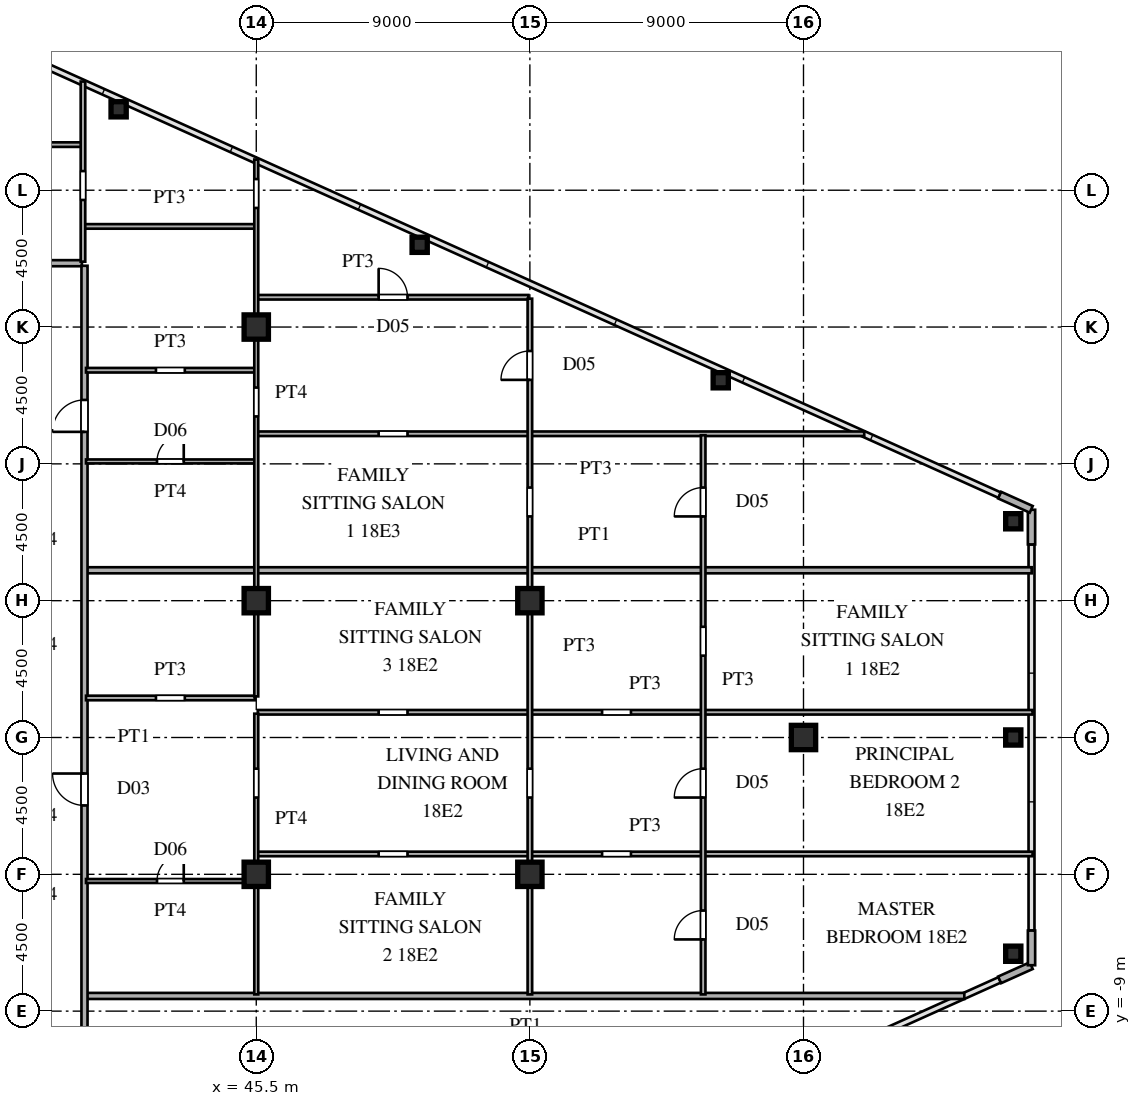
"""IFC4 building model, lengths in metres.
Left out: names, types, materials, properties, quantities, classifications, styles, units other than length and angle.
Written with IfcOpenShell. Run it as: python <this file> out.ifc"""

import sys

from ifc_helpers import new_model, si_unit, direction, frame, frame_2d, origin, origin_2d, place, context, subcontext, project, spatial, rectangle, hollow_rectangle, i_section, extrude, source, transform, mapped, element, fill, save


model = new_model("IFC4")
c1 = context("Model", 3, precision=1e-05, world=origin(), true_north=direction((0.0, 1.0)))
c2 = subcontext(c1, "Body", "Model", "MODEL_VIEW")
j1 = project(units=[si_unit("LENGTHUNIT", "METRE"), si_unit("PLANEANGLEUNIT", "RADIAN")], contexts=[c1])
p1 = place(None, origin())
s1 = spatial("IfcSite", under=j1, at=p1, CompositionType="ELEMENT")
p2 = place(p1, origin())
s2 = spatial("IfcBuilding", under=s1, at=p2, CompositionType="ELEMENT")
p3 = place(p2, frame((0.0, 0.0, 69.3)))
s3 = spatial("IfcBuildingStorey", under=s2, at=p3, CompositionType="ELEMENT", Elevation=69.3)
m1 = source(origin(), c2, "Body", "SweptSolid", [
    extrude(i_section(OverallWidth=0.8, OverallDepth=0.8, WebThickness=0.032, FlangeThickness=0.05, at=origin_2d()), origin(), (0.0, 0.0, 1.0), 3.6),
])
for number, where, z_axis, x_axis in (
    (1, (45.5, -4.5, 0.0), (0.0, 0.0, 1.0), (1.0, 0.0, 0.0)),
    (2, (45.5, 4.5, 0.0), (0.0, 0.0, 1.0), (1.0, 0.0, 0.0)),
    (3, (45.5, 13.5, 0.0), (0.0, 0.0, 1.0), (1.0, 0.0, 0.0)),
    (4, (54.5, -4.5, 0.0), (0.0, 0.0, 1.0), (1.0, 0.0, 0.0)),
    (5, (54.5, 4.5, 0.0), (0.0, 0.0, 1.0), (1.0, 0.0, 0.0)),
    (6, (63.5, 0.0, 0.0), (0.0, 0.0, 1.0), (1.0, 0.0, 0.0)),
):
    element("IfcColumn", number, at=place(p3, frame(where, z_axis=z_axis, x_axis=x_axis)), inside=s3, PredefinedType="COLUMN", context=c2, shape_type="MappedRepresentation", body=[
        mapped(m1, transform((0.0, 0.0, 0.0), scale=1.0)),
    ])
m2 = source(origin(), c2, "Body", "SweptSolid", [
    extrude(hollow_rectangle(XDim=0.5, YDim=0.5, WallThickness=0.02, at=origin_2d()), origin(), (0.0, 0.0, 1.0), 3.6),
])
for number, where, z_axis, x_axis in (
    (7, (70.4, -7.112, 0.0), (0.0, 0.0, 1.0), (1.0, 0.0, 0.0)),
    (8, (70.4, 7.112, 0.0), (0.0, 0.0, 1.0), (1.0, 0.0, 0.0)),
    (9, (40.973, 20.661, 0.0), (0.0, 0.0, 1.0), (1.0, 0.0, 0.0)),
    (10, (50.875, 16.205, 0.0), (0.0, 0.0, 1.0), (1.0, 0.0, 0.0)),
    (11, (60.778, 11.749, 0.0), (0.0, 0.0, 1.0), (1.0, 0.0, 0.0)),
    (12, (70.4, 0.0, 0.0), (0.0, 0.0, 1.0), (1.0, 0.0, 0.0)),
):
    element("IfcColumn", number, at=place(p3, frame(where, z_axis=z_axis, x_axis=x_axis)), inside=s3, PredefinedType="COLUMN", context=c2, shape_type="MappedRepresentation", body=[
        mapped(m2, transform((0.0, 0.0, 0.0), scale=1.0)),
    ])
for number, where, z_axis, x_axis in (
    (13, (69.951, -7.972, 0.0), (0.0, 0.0, 1.0), (0.912, 0.41, 0.0)),
    (14, (71.0, -7.49, 0.0), (0.0, 0.0, 1.0), (0.0, 1.0, 0.0)),
    (15, (71.0, 6.35, 0.0), (0.0, 0.0, 1.0), (0.0, 1.0, 0.0)),
    (16, (70.991, 7.504, 0.0), (0.0, 0.0, 1.0), (-0.912, 0.41, 0.0)),
):
    element("IfcWall", number, at=place(p3, frame(where, z_axis=z_axis, x_axis=x_axis)), inside=s3, PredefinedType="SOLIDWALL", context=c2, shape_type="SweptSolid", body=[
        extrude(rectangle(XDim=1.14, YDim=0.24, at=frame_2d((0.57, 0.0))), origin(), (0.0, 0.0, 1.0), 3.38),
    ])
p4 = place(p3, frame((39.93, -8.5, 0.0), z_axis=(0.0, 0.0, 1.0), x_axis=(1.0, 0.0, 0.0)))
e17 = element("IfcWall", 17, at=p4, inside=s3, PredefinedType="PARTITIONING", context=c2, shape_type="SweptSolid", body=[
    extrude(rectangle(XDim=28.86, YDim=0.2, at=frame_2d((14.43, 0.0))), origin(), (0.0, 0.0, 1.0), 3.38),
])
p5 = place(p3, frame((39.9, -4.72, 0.0), z_axis=(0.0, 0.0, 1.0), x_axis=(1.0, 0.0, 0.0)))
e18 = element("IfcWall", 18, at=p5, inside=s3, PredefinedType="PARTITIONING", context=c2, shape_type="SweptSolid", body=[
    extrude(rectangle(XDim=5.55, YDim=0.13, at=frame_2d((2.775, 0.0))), origin(), (0.0, 0.0, 1.0), 3.38),
])
p6 = place(p5, frame((2.335, 0.0, 0.0)))
e19 = element("IfcOpeningElement", 19, at=p6, cuts=e18, PredefinedType="OPENING", context=c2, shape_type="SweptSolid", body=[
    extrude(rectangle(XDim=0.88, YDim=2.1, at=frame_2d((0.44, 1.05))), frame((0.0, 0.075, 0.0), z_axis=(0.0, -1.0, 0.0), x_axis=(1.0, 0.0, 0.0)), (0.0, 0.0, 1.0), 0.15),
])
p7 = place(p3, frame((45.55, -3.83, 0.0), z_axis=(0.0, 0.0, 1.0), x_axis=(1.0, 0.0, 0.0)))
e20 = element("IfcWall", 20, at=p7, inside=s3, PredefinedType="PARTITIONING", context=c2, shape_type="SweptSolid", body=[
    extrude(rectangle(XDim=25.485, YDim=0.15, at=frame_2d((12.742, 0.0))), origin(), (0.0, 0.0, 1.0), 3.38),
])
p8 = place(p7, frame((3.975, 0.0, 0.0)))
e21 = element("IfcOpeningElement", 21, at=p8, cuts=e20, PredefinedType="OPENING", context=c2, shape_type="SweptSolid", body=[
    extrude(rectangle(XDim=0.95, YDim=2.15, at=frame_2d((0.475, 1.075))), frame((0.0, 0.085, 0.0), z_axis=(0.0, -1.0, 0.0), x_axis=(1.0, 0.0, 0.0)), (0.0, 0.0, 1.0), 0.17),
])
p9 = place(p7, frame((11.325, 0.0, 0.0)))
e22 = element("IfcOpeningElement", 22, at=p9, cuts=e20, PredefinedType="OPENING", context=c2, shape_type="SweptSolid", body=[
    extrude(rectangle(XDim=0.95, YDim=2.15, at=frame_2d((0.475, 1.075))), frame((0.0, 0.085, 0.0), z_axis=(0.0, -1.0, 0.0), x_axis=(1.0, 0.0, 0.0)), (0.0, 0.0, 1.0), 0.17),
])
p10 = place(p3, frame((45.55, 0.83, 0.0), z_axis=(0.0, 0.0, 1.0), x_axis=(1.0, 0.0, 0.0)))
e23 = element("IfcWall", 23, at=p10, inside=s3, PredefinedType="PARTITIONING", context=c2, shape_type="SweptSolid", body=[
    extrude(rectangle(XDim=25.485, YDim=0.15, at=frame_2d((12.742, 0.0))), origin(), (0.0, 0.0, 1.0), 3.38),
])
p11 = place(p10, frame((3.975, 0.0, 0.0)))
e24 = element("IfcOpeningElement", 24, at=p11, cuts=e23, PredefinedType="OPENING", context=c2, shape_type="SweptSolid", body=[
    extrude(rectangle(XDim=0.95, YDim=2.15, at=frame_2d((0.475, 1.075))), frame((0.0, 0.085, 0.0), z_axis=(0.0, -1.0, 0.0), x_axis=(1.0, 0.0, 0.0)), (0.0, 0.0, 1.0), 0.17),
])
p12 = place(p10, frame((11.325, 0.0, 0.0)))
e25 = element("IfcOpeningElement", 25, at=p12, cuts=e23, PredefinedType="OPENING", context=c2, shape_type="SweptSolid", body=[
    extrude(rectangle(XDim=0.95, YDim=2.15, at=frame_2d((0.475, 1.075))), frame((0.0, 0.085, 0.0), z_axis=(0.0, -1.0, 0.0), x_axis=(1.0, 0.0, 0.0)), (0.0, 0.0, 1.0), 0.17),
])
p13 = place(p3, frame((39.9, 1.3, 0.0), z_axis=(0.0, 0.0, 1.0), x_axis=(1.0, 0.0, 0.0)))
e26 = element("IfcWall", 26, at=p13, inside=s3, PredefinedType="PARTITIONING", context=c2, shape_type="SweptSolid", body=[
    extrude(rectangle(XDim=5.55, YDim=0.15, at=frame_2d((2.775, 0.0))), origin(), (0.0, 0.0, 1.0), 3.38),
])
p14 = place(p13, frame((2.3, 0.0, 0.0)))
e27 = element("IfcOpeningElement", 27, at=p14, cuts=e26, PredefinedType="OPENING", context=c2, shape_type="SweptSolid", body=[
    extrude(rectangle(XDim=0.95, YDim=2.15, at=frame_2d((0.475, 1.075))), frame((0.0, 0.085, 0.0), z_axis=(0.0, -1.0, 0.0), x_axis=(1.0, 0.0, 0.0)), (0.0, 0.0, 1.0), 0.17),
])
p15 = place(p3, frame((39.93, 5.5, 0.0), z_axis=(0.0, 0.0, 1.0), x_axis=(1.0, 0.0, 0.0)))
e28 = element("IfcWall", 28, at=p15, inside=s3, PredefinedType="PARTITIONING", context=c2, shape_type="SweptSolid", body=[
    extrude(rectangle(XDim=31.075, YDim=0.2, at=frame_2d((15.538, 0.0))), origin(), (0.0, 0.0, 1.0), 3.38),
])
p16 = place(p3, frame((39.9, 9.08, 0.0), z_axis=(0.0, 0.0, 1.0), x_axis=(1.0, 0.0, 0.0)))
e29 = element("IfcWall", 29, at=p16, inside=s3, PredefinedType="PARTITIONING", context=c2, shape_type="SweptSolid", body=[
    extrude(rectangle(XDim=5.55, YDim=0.13, at=frame_2d((2.775, 0.0))), origin(), (0.0, 0.0, 1.0), 3.38),
])
p17 = place(p16, frame((2.335, 0.0, 0.0)))
e30 = element("IfcOpeningElement", 30, at=p17, cuts=e29, PredefinedType="OPENING", context=c2, shape_type="SweptSolid", body=[
    extrude(rectangle(XDim=0.88, YDim=2.1, at=frame_2d((0.44, 1.05))), frame((0.0, 0.075, 0.0), z_axis=(0.0, -1.0, 0.0), x_axis=(1.0, 0.0, 0.0)), (0.0, 0.0, 1.0), 0.15),
])
p18 = place(p3, frame((45.55, 9.99, 0.0), z_axis=(0.0, 0.0, 1.0), x_axis=(1.0, 0.0, 0.0)))
e31 = element("IfcWall", 31, at=p18, inside=s3, PredefinedType="PARTITIONING", context=c2, shape_type="SweptSolid", body=[
    extrude(rectangle(XDim=19.948, YDim=0.15, at=frame_2d((9.974, 0.0))), origin(), (0.0, 0.0, 1.0), 3.38),
])
p19 = place(p18, frame((3.975, 0.0, 0.0)))
e32 = element("IfcOpeningElement", 32, at=p19, cuts=e31, PredefinedType="OPENING", context=c2, shape_type="SweptSolid", body=[
    extrude(rectangle(XDim=0.95, YDim=2.15, at=frame_2d((0.475, 1.075))), frame((0.0, 0.085, 0.0), z_axis=(0.0, -1.0, 0.0), x_axis=(1.0, 0.0, 0.0)), (0.0, 0.0, 1.0), 0.17),
])
p20 = place(p3, frame((39.9, 12.08, 0.0), z_axis=(0.0, 0.0, 1.0), x_axis=(1.0, 0.0, 0.0)))
e33 = element("IfcWall", 33, at=p20, inside=s3, PredefinedType="PARTITIONING", context=c2, shape_type="SweptSolid", body=[
    extrude(rectangle(XDim=5.55, YDim=0.15, at=frame_2d((2.775, 0.0))), origin(), (0.0, 0.0, 1.0), 3.38),
])
p21 = place(p20, frame((2.3, 0.0, 0.0)))
e34 = element("IfcOpeningElement", 34, at=p21, cuts=e33, PredefinedType="OPENING", context=c2, shape_type="SweptSolid", body=[
    extrude(rectangle(XDim=0.95, YDim=2.15, at=frame_2d((0.475, 1.075))), frame((0.0, 0.085, 0.0), z_axis=(0.0, -1.0, 0.0), x_axis=(1.0, 0.0, 0.0)), (0.0, 0.0, 1.0), 0.17),
])
p22 = place(p3, frame((45.55, 14.48, 0.0), z_axis=(0.0, 0.0, 1.0), x_axis=(1.0, 0.0, 0.0)))
e35 = element("IfcWall", 35, at=p22, inside=s3, PredefinedType="PARTITIONING", context=c2, shape_type="SweptSolid", body=[
    extrude(rectangle(XDim=8.9, YDim=0.15, at=frame_2d((4.45, 0.0))), origin(), (0.0, 0.0, 1.0), 3.38),
])
p23 = place(p22, frame((3.975, 0.0, 0.0)))
e36 = element("IfcOpeningElement", 36, at=p23, cuts=e35, PredefinedType="OPENING", context=c2, shape_type="SweptSolid", body=[
    extrude(rectangle(XDim=0.95, YDim=2.15, at=frame_2d((0.475, 1.075))), frame((0.0, 0.085, 0.0), z_axis=(0.0, -1.0, 0.0), x_axis=(1.0, 0.0, 0.0)), (0.0, 0.0, 1.0), 0.17),
])
p24 = place(p3, frame((36.585, 15.6, 0.0), z_axis=(0.0, 0.0, 1.0), x_axis=(1.0, 0.0, 0.0)))
e37 = element("IfcWall", 37, at=p24, inside=s3, PredefinedType="PARTITIONING", context=c2, shape_type="SweptSolid", body=[
    extrude(rectangle(XDim=3.18, YDim=0.2, at=frame_2d((1.59, 0.0))), origin(), (0.0, 0.0, 1.0), 3.38),
])
p25 = place(p3, frame((39.85, 16.81, 0.0), z_axis=(0.0, 0.0, 1.0), x_axis=(1.0, 0.0, 0.0)))
e38 = element("IfcWall", 38, at=p25, inside=s3, PredefinedType="PARTITIONING", context=c2, shape_type="SweptSolid", body=[
    extrude(rectangle(XDim=5.6, YDim=0.15, at=frame_2d((2.8, 0.0))), origin(), (0.0, 0.0, 1.0), 3.38),
])
p26 = place(p3, frame((27.465, 19.5, 0.0), z_axis=(0.0, 0.0, 1.0), x_axis=(1.0, 0.0, 0.0)))
e39 = element("IfcWall", 39, at=p26, inside=s3, PredefinedType="PARTITIONING", context=c2, shape_type="SweptSolid", body=[
    extrude(rectangle(XDim=12.285, YDim=0.15, at=frame_2d((6.143, 0.0))), origin(), (0.0, 0.0, 1.0), 3.38),
])
p27 = place(p26, frame((5.71, 0.0, 0.0)))
e40 = element("IfcOpeningElement", 40, at=p27, cuts=e39, PredefinedType="OPENING", context=c2, shape_type="SweptSolid", body=[
    extrude(rectangle(XDim=0.95, YDim=2.15, at=frame_2d((0.475, 1.075))), frame((0.0, 0.085, 0.0), z_axis=(0.0, -1.0, 0.0), x_axis=(1.0, 0.0, 0.0)), (0.0, 0.0, 1.0), 0.17),
])
p28 = place(p3, frame((39.8, 15.65, 0.0), z_axis=(0.0, 0.0, 1.0), x_axis=(0.0, 1.0, 0.0)))
e41 = element("IfcWall", 41, at=p28, inside=s3, PredefinedType="PARTITIONING", context=c2, shape_type="SweptSolid", body=[
    extrude(rectangle(XDim=5.925, YDim=0.15, at=frame_2d((2.962, 0.0))), origin(), (0.0, 0.0, 1.0), 3.38),
])
p29 = place(p28, frame((2.029, 0.0, 0.0)))
e42 = element("IfcOpeningElement", 42, at=p29, cuts=e41, PredefinedType="OPENING", context=c2, shape_type="SweptSolid", body=[
    extrude(rectangle(XDim=0.95, YDim=2.15, at=frame_2d((0.475, 1.075))), frame((0.0, 0.085, 0.0), z_axis=(0.0, -1.0, 0.0), x_axis=(1.0, 0.0, 0.0)), (0.0, 0.0, 1.0), 0.17),
])
p30 = place(p3, frame((39.85, -15.515, 0.0), z_axis=(0.0, 0.0, 1.0), x_axis=(0.0, 1.0, 0.0)))
e43 = element("IfcWall", 43, at=p30, inside=s3, PredefinedType="PARTITIONING", context=c2, shape_type="SweptSolid", body=[
    extrude(rectangle(XDim=31.03, YDim=0.2, at=frame_2d((15.515, 0.0))), origin(), (0.0, 0.0, 1.0), 3.38),
])
p31 = place(p30, frame((2.94, 0.0, 0.0)))
e44 = element("IfcOpeningElement", 44, at=p31, cuts=e43, PredefinedType="OPENING", context=c2, shape_type="SweptSolid", body=[
    extrude(rectangle(XDim=1.05, YDim=2.25, at=frame_2d((0.525, 1.125))), frame((0.0, 0.11, 0.0), z_axis=(0.0, -1.0, 0.0), x_axis=(1.0, 0.0, 0.0)), (0.0, 0.0, 1.0), 0.22),
])
p32 = place(p30, frame((13.28, 0.0, 0.0)))
e45 = element("IfcOpeningElement", 45, at=p32, cuts=e43, PredefinedType="OPENING", context=c2, shape_type="SweptSolid", body=[
    extrude(rectangle(XDim=1.05, YDim=2.25, at=frame_2d((0.525, 1.125))), frame((0.0, 0.11, 0.0), z_axis=(0.0, -1.0, 0.0), x_axis=(1.0, 0.0, 0.0)), (0.0, 0.0, 1.0), 0.22),
])
p33 = place(p30, frame((25.567, 0.0, 0.0)))
e46 = element("IfcOpeningElement", 46, at=p33, cuts=e43, PredefinedType="OPENING", context=c2, shape_type="SweptSolid", body=[
    extrude(rectangle(XDim=1.05, YDim=2.25, at=frame_2d((0.525, 1.125))), frame((0.0, 0.11, 0.0), z_axis=(0.0, -1.0, 0.0), x_axis=(1.0, 0.0, 0.0)), (0.0, 0.0, 1.0), 0.22),
])
p34 = place(p3, frame((45.5, -8.45, 0.0), z_axis=(0.0, 0.0, 1.0), x_axis=(0.0, 1.0, 0.0)))
e47 = element("IfcWall", 47, at=p34, inside=s3, PredefinedType="PARTITIONING", context=c2, shape_type="SweptSolid", body=[
    extrude(rectangle(XDim=9.233, YDim=0.13, at=frame_2d((4.616, 0.0))), origin(), (0.0, 0.0, 1.0), 2.68),
])
p35 = place(p34, frame((6.475, 0.0, 0.0)))
e48 = element("IfcOpeningElement", 48, at=p35, cuts=e47, PredefinedType="OPENING", context=c2, shape_type="SweptSolid", body=[
    extrude(rectangle(XDim=0.95, YDim=2.15, at=frame_2d((0.475, 1.075))), frame((0.0, 0.075, 0.0), z_axis=(0.0, -1.0, 0.0), x_axis=(1.0, 0.0, 0.0)), (0.0, 0.0, 1.0), 0.15),
])
p36 = place(p3, frame((45.5, 1.352, 0.0), z_axis=(0.0, 0.0, 1.0), x_axis=(0.0, 1.0, 0.0)))
e49 = element("IfcWall", 49, at=p36, inside=s3, PredefinedType="PARTITIONING", context=c2, shape_type="SweptSolid", body=[
    extrude(rectangle(XDim=17.658, YDim=0.13, at=frame_2d((8.829, 0.0))), origin(), (0.0, 0.0, 1.0), 2.68),
])
p37 = place(p36, frame((9.208, 0.0, 0.0)))
e50 = element("IfcOpeningElement", 50, at=p37, cuts=e49, PredefinedType="OPENING", context=c2, shape_type="SweptSolid", body=[
    extrude(rectangle(XDim=0.95, YDim=2.15, at=frame_2d((0.475, 1.075))), frame((0.0, 0.075, 0.0), z_axis=(0.0, -1.0, 0.0), x_axis=(1.0, 0.0, 0.0)), (0.0, 0.0, 1.0), 0.15),
])
p38 = place(p36, frame((16.065, 0.0, 0.0)))
e51 = element("IfcOpeningElement", 51, at=p38, cuts=e49, PredefinedType="OPENING", context=c2, shape_type="SweptSolid", body=[
    extrude(rectangle(XDim=0.95, YDim=2.15, at=frame_2d((0.475, 1.075))), frame((0.0, 0.075, 0.0), z_axis=(0.0, -1.0, 0.0), x_axis=(1.0, 0.0, 0.0)), (0.0, 0.0, 1.0), 0.15),
])
p39 = place(p3, frame((54.5, -8.45, 0.0), z_axis=(0.0, 0.0, 1.0), x_axis=(0.0, 1.0, 0.0)))
e52 = element("IfcWall", 52, at=p39, inside=s3, PredefinedType="PARTITIONING", context=c2, shape_type="SweptSolid", body=[
    extrude(rectangle(XDim=22.883, YDim=0.15, at=frame_2d((11.441, 0.0))), origin(), (0.0, 0.0, 1.0), 2.68),
])
p40 = place(p39, frame((6.475, 0.0, 0.0)))
e53 = element("IfcOpeningElement", 53, at=p40, cuts=e52, PredefinedType="OPENING", context=c2, shape_type="SweptSolid", body=[
    extrude(rectangle(XDim=0.95, YDim=2.15, at=frame_2d((0.475, 1.075))), frame((0.0, 0.085, 0.0), z_axis=(0.0, -1.0, 0.0), x_axis=(1.0, 0.0, 0.0)), (0.0, 0.0, 1.0), 0.17),
])
p41 = place(p39, frame((20.212, 0.0, 0.0)))
e54 = element("IfcOpeningElement", 54, at=p41, cuts=e52, PredefinedType="OPENING", context=c2, shape_type="SweptSolid", body=[
    extrude(rectangle(XDim=0.95, YDim=2.15, at=frame_2d((0.475, 1.075))), frame((0.0, 0.085, 0.0), z_axis=(0.0, -1.0, 0.0), x_axis=(1.0, 0.0, 0.0)), (0.0, 0.0, 1.0), 0.17),
])
p42 = place(p39, frame((15.721, 0.0, 0.0)))
e55 = element("IfcOpeningElement", 55, at=p42, cuts=e52, PredefinedType="OPENING", context=c2, shape_type="SweptSolid", body=[
    extrude(rectangle(XDim=0.95, YDim=2.15, at=frame_2d((0.475, 1.075))), frame((0.0, 0.085, 0.0), z_axis=(0.0, -1.0, 0.0), x_axis=(1.0, 0.0, 0.0)), (0.0, 0.0, 1.0), 0.17),
])
p43 = place(p3, frame((60.2, -8.45, 0.0), z_axis=(0.0, 0.0, 1.0), x_axis=(0.0, 1.0, 0.0)))
e56 = element("IfcWall", 56, at=p43, inside=s3, PredefinedType="PARTITIONING", context=c2, shape_type="SweptSolid", body=[
    extrude(rectangle(XDim=18.392, YDim=0.15, at=frame_2d((9.196, 0.0))), origin(), (0.0, 0.0, 1.0), 3.38),
])
p44 = place(p43, frame((1.808, 0.0, 0.0)))
e57 = element("IfcOpeningElement", 57, at=p44, cuts=e56, PredefinedType="OPENING", context=c2, shape_type="SweptSolid", body=[
    extrude(rectangle(XDim=0.95, YDim=2.15, at=frame_2d((0.475, 1.075))), frame((0.0, 0.085, 0.0), z_axis=(0.0, -1.0, 0.0), x_axis=(1.0, 0.0, 0.0)), (0.0, 0.0, 1.0), 0.17),
])
p45 = place(p43, frame((6.475, 0.0, 0.0)))
e58 = element("IfcOpeningElement", 58, at=p45, cuts=e56, PredefinedType="OPENING", context=c2, shape_type="SweptSolid", body=[
    extrude(rectangle(XDim=0.95, YDim=2.15, at=frame_2d((0.475, 1.075))), frame((0.0, 0.085, 0.0), z_axis=(0.0, -1.0, 0.0), x_axis=(1.0, 0.0, 0.0)), (0.0, 0.0, 1.0), 0.17),
])
p46 = place(p43, frame((11.142, 0.0, 0.0)))
e59 = element("IfcOpeningElement", 59, at=p46, cuts=e56, PredefinedType="OPENING", context=c2, shape_type="SweptSolid", body=[
    extrude(rectangle(XDim=0.95, YDim=2.15, at=frame_2d((0.475, 1.075))), frame((0.0, 0.085, 0.0), z_axis=(0.0, -1.0, 0.0), x_axis=(1.0, 0.0, 0.0)), (0.0, 0.0, 1.0), 0.17),
])
p47 = place(p43, frame((15.721, 0.0, 0.0)))
e60 = element("IfcOpeningElement", 60, at=p47, cuts=e56, PredefinedType="OPENING", context=c2, shape_type="SweptSolid", body=[
    extrude(rectangle(XDim=0.95, YDim=2.15, at=frame_2d((0.475, 1.075))), frame((0.0, 0.085, 0.0), z_axis=(0.0, -1.0, 0.0), x_axis=(1.0, 0.0, 0.0)), (0.0, 0.0, 1.0), 0.17),
])
m3 = source(origin(), c2, "Body", "SweptSolid", [
    extrude(rectangle(XDim=0.88, YDim=2.1, at=frame_2d((0.44, 1.05))), frame((0.0, 0.025, 0.0), z_axis=(0.0, -1.0, 0.0), x_axis=(1.0, 0.0, 0.0)), (0.0, 0.0, 1.0), 0.05),
])
p48 = place(p6, origin())
e61 = element("IfcDoor", 61, at=p48, inside=s3, OperationType="SINGLE_SWING_RIGHT", PredefinedType="DOOR", context=c2, shape_type="MappedRepresentation", body=[
    mapped(m3, transform((0.0, 0.0, 0.0), scale=1.0)),
])
fill(e19, e61)
p49 = place(p17, origin())
e62 = element("IfcDoor", 62, at=p49, inside=s3, OperationType="SINGLE_SWING_RIGHT", PredefinedType="DOOR", context=c2, shape_type="MappedRepresentation", body=[
    mapped(m3, transform((0.0, 0.0, 0.0), scale=1.0)),
])
fill(e30, e62)
m4 = source(origin(), c2, "Body", "SweptSolid", [
    extrude(rectangle(XDim=0.95, YDim=2.15, at=frame_2d((0.475, 1.075))), frame((0.0, 0.025, 0.0), z_axis=(0.0, -1.0, 0.0), x_axis=(1.0, 0.0, 0.0)), (0.0, 0.0, 1.0), 0.05),
])
p50 = place(p23, origin())
e63 = element("IfcDoor", 63, at=p50, inside=s3, OperationType="SINGLE_SWING_LEFT", PredefinedType="DOOR", context=c2, shape_type="MappedRepresentation", body=[
    mapped(m4, transform((0.0, 0.0, 0.0), scale=1.0)),
])
fill(e36, e63)
m5 = source(origin(), c2, "Body", "SweptSolid", [
    extrude(rectangle(XDim=1.05, YDim=2.25, at=frame_2d((0.525, 1.125))), frame((0.0, 0.025, 0.0), z_axis=(0.0, -1.0, 0.0), x_axis=(1.0, 0.0, 0.0)), (0.0, 0.0, 1.0), 0.05),
])
p51 = place(p32, origin())
e64 = element("IfcDoor", 64, at=p51, inside=s3, OperationType="SINGLE_SWING_RIGHT", PredefinedType="DOOR", context=c2, shape_type="MappedRepresentation", body=[
    mapped(m5, transform((0.0, 0.0, 0.0), scale=1.0)),
])
fill(e45, e64)
p52 = place(p33, origin())
e65 = element("IfcDoor", 65, at=p52, inside=s3, OperationType="SINGLE_SWING_LEFT", PredefinedType="DOOR", context=c2, shape_type="MappedRepresentation", body=[
    mapped(m5, transform((0.0, 0.0, 0.0), scale=1.0)),
])
fill(e46, e65)
p53 = place(p41, origin())
e66 = element("IfcDoor", 66, at=p53, inside=s3, OperationType="SINGLE_SWING_LEFT", PredefinedType="DOOR", context=c2, shape_type="MappedRepresentation", body=[
    mapped(m4, transform((0.0, 0.0, 0.0), scale=1.0)),
])
fill(e54, e66)
p54 = place(p44, origin())
e67 = element("IfcDoor", 67, at=p54, inside=s3, OperationType="SINGLE_SWING_LEFT", PredefinedType="DOOR", context=c2, shape_type="MappedRepresentation", body=[
    mapped(m4, transform((0.0, 0.0, 0.0), scale=1.0)),
])
fill(e57, e67)
p55 = place(p45, origin())
e68 = element("IfcDoor", 68, at=p55, inside=s3, OperationType="SINGLE_SWING_LEFT", PredefinedType="DOOR", context=c2, shape_type="MappedRepresentation", body=[
    mapped(m4, transform((0.0, 0.0, 0.0), scale=1.0)),
])
fill(e58, e68)
p56 = place(p47, origin())
e69 = element("IfcDoor", 69, at=p56, inside=s3, OperationType="SINGLE_SWING_LEFT", PredefinedType="DOOR", context=c2, shape_type="MappedRepresentation", body=[
    mapped(m4, transform((0.0, 0.0, 0.0), scale=1.0)),
])
fill(e60, e69)
save(model, sys.argv[1])
